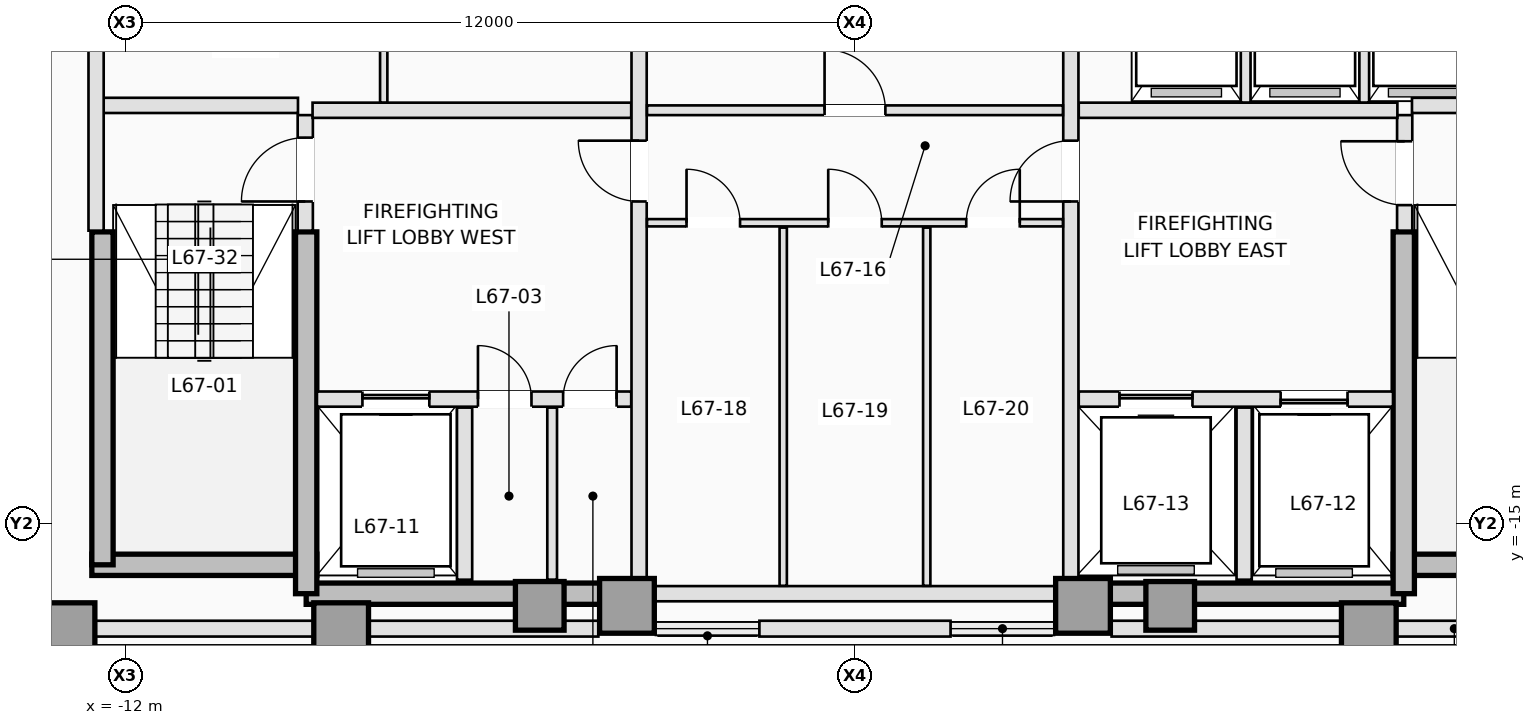
"""IFC4 building model, lengths in metres.
Left out: names, types, materials, properties, quantities, classifications, styles, units other than length and angle.
Written with IfcOpenShell. Run it as: python <this file> out.ifc"""

import sys

from ifc_helpers import new_model, si_unit, direction, frame, frame_2d, origin, origin_2d, place, context, subcontext, project, spatial, rectangle, extrude, element, fill, save


model = new_model("IFC4")
c1 = context("Model", 3, precision=1e-05, world=origin(), true_north=direction((0.0, 1.0)))
c2 = subcontext(c1, "Body", "Model", "MODEL_VIEW")
j1 = project(units=[si_unit("LENGTHUNIT", "METRE"), si_unit("PLANEANGLEUNIT", "RADIAN")], contexts=[c1])
p1 = place(None, origin())
s1 = spatial("IfcSite", under=j1, at=p1, CompositionType="ELEMENT")
p2 = place(p1, origin())
s2 = spatial("IfcBuilding", under=s1, at=p2, CompositionType="ELEMENT")
p3 = place(p2, frame((0.0, 0.0, 242.9)))
s3 = spatial("IfcBuildingStorey", under=s2, at=p3, CompositionType="ELEMENT", Elevation=242.9)
p4 = place(p3, frame((-12.55, -15.675, 0.0), z_axis=(0.0, 0.0, 1.0), x_axis=(1.0, 0.0, 0.0)))
e1 = element("IfcWall", 1, at=p4, inside=s3, PredefinedType="SHEAR", context=c2, shape_type="SweptSolid", body=[
    extrude(rectangle(XDim=3.7, YDim=0.35, at=frame_2d((1.85, 0.0))), origin(), (0.0, 0.0, 1.0), 3.5),
])
for number, where, z_axis, x_axis in (
    (2, (-9.025, -16.15, 0.0), (0.0, 0.0, 1.0), (1.0, 0.0, 0.0)),
    (3, (3.75, -16.15, 0.0), (0.0, 0.0, 1.0), (1.0, 0.0, 0.0)),
):
    element("IfcWall", number, at=place(p3, frame(where, z_axis=z_axis, x_axis=x_axis)), inside=s3, PredefinedType="SHEAR", context=c2, shape_type="SweptSolid", body=[
        extrude(rectangle(XDim=5.275, YDim=0.35, at=frame_2d((2.637, 0.0))), origin(), (0.0, 0.0, 1.0), 3.5),
    ])
p5 = place(p3, frame((8.85, -15.675, 0.0), z_axis=(0.0, 0.0, 1.0), x_axis=(1.0, 0.0, 0.0)))
e4 = element("IfcWall", 4, at=p5, inside=s3, PredefinedType="SHEAR", context=c2, shape_type="SweptSolid", body=[
    extrude(rectangle(XDim=3.7, YDim=0.35, at=frame_2d((1.85, 0.0))), origin(), (0.0, 0.0, 1.0), 3.5),
])
p6 = place(p3, frame((-12.375, -15.675, 0.0), z_axis=(0.0, 0.0, 1.0), x_axis=(0.0, 1.0, 0.0)))
e5 = element("IfcWall", 5, at=p6, inside=s3, PredefinedType="SHEAR", context=c2, shape_type="SweptSolid", body=[
    extrude(rectangle(XDim=5.475, YDim=0.35, at=frame_2d((2.738, 0.0))), origin(), (0.0, 0.0, 1.0), 3.5),
])
for number, where, z_axis, x_axis in (
    (6, (-9.025, -16.15, 0.0), (0.0, 0.0, 1.0), (0.0, 1.0, 0.0)),
    (7, (9.025, -16.15, 0.0), (0.0, 0.0, 1.0), (0.0, 1.0, 0.0)),
):
    element("IfcWall", number, at=place(p3, frame(where, z_axis=z_axis, x_axis=x_axis)), inside=s3, PredefinedType="SHEAR", context=c2, shape_type="SweptSolid", body=[
        extrude(rectangle(XDim=5.95, YDim=0.35, at=frame_2d((2.975, 0.0))), origin(), (0.0, 0.0, 1.0), 3.5),
    ])
for number, where, z_axis, x_axis in (
    (8, (-12.95, -16.75, 0.0), (0.0, 0.0, 1.0), (1.0, 0.0, 0.0)),
    (9, (-8.45, -16.75, 0.0), (0.0, 0.0, 1.0), (1.0, 0.0, 0.0)),
    (10, (-3.75, -16.35, 0.0), (0.0, 0.0, 1.0), (1.0, 0.0, 0.0)),
    (11, (3.75, -16.35, 0.0), (0.0, 0.0, 1.0), (1.0, 0.0, 0.0)),
    (12, (8.45, -16.75, 0.0), (0.0, 0.0, 1.0), (1.0, 0.0, 0.0)),
):
    element("IfcColumn", number, at=place(p3, frame(where, z_axis=z_axis, x_axis=x_axis)), inside=s3, PredefinedType="COLUMN", context=c2, shape_type="SweptSolid", body=[
        extrude(rectangle(XDim=0.9, YDim=0.9, at=origin_2d()), origin(), (0.0, 0.0, 1.0), 3.5),
    ])
for number, where, z_axis, x_axis in (
    (13, (-5.184, -16.35, 0.0), (0.0, 0.0, 1.0), (0.0, 1.0, 0.0)),
    (14, (5.184, -16.35, 0.0), (0.0, 0.0, 1.0), (0.0, 1.0, 0.0)),
):
    element("IfcColumn", number, at=place(p3, frame(where, z_axis=z_axis, x_axis=x_axis)), inside=s3, PredefinedType="COLUMN", context=c2, shape_type="SweptSolid", body=[
        extrude(rectangle(XDim=0.8, YDim=0.8, at=origin_2d()), origin(), (0.0, 0.0, 1.0), 3.5),
    ])
for number, where, z_axis, x_axis in (
    (15, (15.493, -16.725, 0.0), (0.0, 0.0, 1.0), (-1.0, 0.0, 0.0)),
    (16, (-4.22, -16.725, 0.0), (0.0, 0.0, 1.0), (-1.0, 0.0, 0.0)),
):
    element("IfcWall", number, at=place(p3, frame(where, z_axis=z_axis, x_axis=x_axis)), inside=s3, PredefinedType="STANDARD", context=c2, shape_type="SweptSolid", body=[
        extrude(rectangle(XDim=11.273, YDim=0.26, at=frame_2d((5.636, 0.0))), origin(), (0.0, 0.0, 1.0), 2.79),
    ])
p7 = place(p3, frame((1.572, -16.725, 0.0), z_axis=(0.0, 0.0, 1.0), x_axis=(-1.0, 0.0, 0.0)))
e17 = element("IfcWall", 17, at=p7, inside=s3, PredefinedType="STANDARD", context=c2, shape_type="SweptSolid", body=[
    extrude(rectangle(XDim=3.143, YDim=0.26, at=frame_2d((1.572, 0.0))), origin(), (0.0, 0.0, 1.0), 3.25),
])
p8 = place(p3, frame((-9.04, -10.18, 0.0), z_axis=(0.0, 0.0, 1.0), x_axis=(0.0, 1.0, 0.0)))
e18 = element("IfcWall", 18, at=p8, inside=s3, PredefinedType="PARTITIONING", context=c2, shape_type="SweptSolid", body=[
    extrude(rectangle(XDim=1.9, YDim=0.25, at=frame_2d((0.95, 0.0))), origin(), (0.0, 0.0, 1.0), 3.25),
])
p9 = place(p8, frame((0.48, 0.0, 0.0)))
e19 = element("IfcOpeningElement", 19, at=p9, cuts=e18, PredefinedType="OPENING", context=c2, shape_type="SweptSolid", body=[
    extrude(rectangle(XDim=1.05, YDim=2.15, at=frame_2d((0.525, 1.075))), frame((0.0, 0.135, 0.0), z_axis=(0.0, -1.0, 0.0), x_axis=(1.0, 0.0, 0.0)), (0.0, 0.0, 1.0), 0.27),
])
p10 = place(p3, frame((9.04, -10.18, 0.0), z_axis=(0.0, 0.0, 1.0), x_axis=(0.0, 1.0, 0.0)))
e20 = element("IfcWall", 20, at=p10, inside=s3, PredefinedType="PARTITIONING", context=c2, shape_type="SweptSolid", body=[
    extrude(rectangle(XDim=1.9, YDim=0.25, at=frame_2d((0.95, 0.0))), origin(), (0.0, 0.0, 1.0), 3.25),
])
p11 = place(p10, frame((0.42, 0.0, 0.0)))
e21 = element("IfcOpeningElement", 21, at=p11, cuts=e20, PredefinedType="OPENING", context=c2, shape_type="SweptSolid", body=[
    extrude(rectangle(XDim=1.05, YDim=2.15, at=frame_2d((0.525, 1.075))), frame((0.0, 0.135, 0.0), z_axis=(0.0, -1.0, 0.0), x_axis=(1.0, 0.0, 0.0)), (0.0, 0.0, 1.0), 0.27),
])
for number, where, z_axis, x_axis in (
    (22, (-12.38, -8.12, 0.0), (0.0, 0.0, 1.0), (1.0, 0.0, 0.0)),
    (23, (9.16, -8.12, 0.0), (0.0, 0.0, 1.0), (1.0, 0.0, 0.0)),
):
    element("IfcWall", number, at=place(p3, frame(where, z_axis=z_axis, x_axis=x_axis)), inside=s3, PredefinedType="PARTITIONING", context=c2, shape_type="SweptSolid", body=[
        extrude(rectangle(XDim=3.22, YDim=0.25, at=frame_2d((1.61, 0.0))), origin(), (0.0, 0.0, 1.0), 3.25),
    ])
p12 = place(p3, frame((-12.48, -10.18, 0.0), z_axis=(0.0, 0.0, 1.0), x_axis=(0.0, 1.0, 0.0)))
e24 = element("IfcWall", 24, at=p12, inside=s3, PredefinedType="PARTITIONING", context=c2, shape_type="SweptSolid", body=[
    extrude(rectangle(XDim=4.84, YDim=0.25, at=frame_2d((2.42, 0.0))), origin(), (0.0, 0.0, 1.0), 3.25),
])
p13 = place(p3, frame((-8.848, -12.95, 0.0), z_axis=(0.0, 0.0, 1.0), x_axis=(1.0, 0.0, 0.0)))
e25 = element("IfcWall", 25, at=p13, inside=s3, PredefinedType="PARTITIONING", context=c2, shape_type="SweptSolid", body=[
    extrude(rectangle(XDim=5.168, YDim=0.25, at=frame_2d((2.584, 0.0))), origin(), (0.0, 0.0, 1.0), 3.25),
])
p14 = place(p13, frame((0.748, 0.0, 0.0)))
e26 = element("IfcOpeningElement", 26, at=p14, cuts=e25, PredefinedType="OPENING", context=c2, shape_type="SweptSolid", body=[
    extrude(rectangle(XDim=1.1, YDim=2.15, at=frame_2d((0.55, 1.075))), frame((0.0, 0.135, 0.0), z_axis=(0.0, -1.0, 0.0), x_axis=(1.0, 0.0, 0.0)), (0.0, 0.0, 1.0), 0.27),
])
p15 = place(p13, frame((2.648, 0.0, 0.0)))
e27 = element("IfcOpeningElement", 27, at=p15, cuts=e25, PredefinedType="OPENING", context=c2, shape_type="SweptSolid", body=[
    extrude(rectangle(XDim=0.88, YDim=2.1, at=frame_2d((0.44, 1.05))), frame((0.0, 0.135, 0.0), z_axis=(0.0, -1.0, 0.0), x_axis=(1.0, 0.0, 0.0)), (0.0, 0.0, 1.0), 0.27),
])
p16 = place(p13, frame((4.048, 0.0, 0.0)))
e28 = element("IfcOpeningElement", 28, at=p16, cuts=e25, PredefinedType="OPENING", context=c2, shape_type="SweptSolid", body=[
    extrude(rectangle(XDim=0.88, YDim=2.1, at=frame_2d((0.44, 1.05))), frame((0.0, 0.135, 0.0), z_axis=(0.0, -1.0, 0.0), x_axis=(1.0, 0.0, 0.0)), (0.0, 0.0, 1.0), 0.27),
])
p17 = place(p3, frame((3.68, -12.95, 0.0), z_axis=(0.0, 0.0, 1.0), x_axis=(1.0, 0.0, 0.0)))
e29 = element("IfcWall", 29, at=p17, inside=s3, PredefinedType="PARTITIONING", context=c2, shape_type="SweptSolid", body=[
    extrude(rectangle(XDim=5.168, YDim=0.25, at=frame_2d((2.584, 0.0))), origin(), (0.0, 0.0, 1.0), 3.25),
])
p18 = place(p17, frame((3.32, 0.0, 0.0)))
e30 = element("IfcOpeningElement", 30, at=p18, cuts=e29, PredefinedType="OPENING", context=c2, shape_type="SweptSolid", body=[
    extrude(rectangle(XDim=1.1, YDim=2.15, at=frame_2d((0.55, 1.075))), frame((0.0, 0.135, 0.0), z_axis=(0.0, -1.0, 0.0), x_axis=(1.0, 0.0, 0.0)), (0.0, 0.0, 1.0), 0.27),
])
p19 = place(p17, frame((0.67, 0.0, 0.0)))
e31 = element("IfcOpeningElement", 31, at=p19, cuts=e29, PredefinedType="OPENING", context=c2, shape_type="SweptSolid", body=[
    extrude(rectangle(XDim=1.2, YDim=2.15, at=frame_2d((0.6, 1.075))), frame((0.0, 0.135, 0.0), z_axis=(0.0, -1.0, 0.0), x_axis=(1.0, 0.0, 0.0)), (0.0, 0.0, 1.0), 0.27),
])
p20 = place(p3, frame((-6.42, -15.92, 0.0), z_axis=(0.0, 0.0, 1.0), x_axis=(0.0, 1.0, 0.0)))
e32 = element("IfcWall", 32, at=p20, inside=s3, PredefinedType="PARTITIONING", context=c2, shape_type="SweptSolid", body=[
    extrude(rectangle(XDim=2.83, YDim=0.25, at=frame_2d((1.415, 0.0))), origin(), (0.0, 0.0, 1.0), 3.25),
])
p21 = place(p3, frame((-4.98, -15.92, 0.0), z_axis=(0.0, 0.0, 1.0), x_axis=(0.0, 1.0, 0.0)))
e33 = element("IfcWall", 33, at=p21, inside=s3, PredefinedType="PARTITIONING", context=c2, shape_type="SweptSolid", body=[
    extrude(rectangle(XDim=2.83, YDim=0.16, at=frame_2d((1.415, 0.0))), origin(), (0.0, 0.0, 1.0), 3.25),
])
p22 = place(p3, frame((6.4, -15.92, 0.0), z_axis=(0.0, 0.0, 1.0), x_axis=(0.0, 1.0, 0.0)))
e34 = element("IfcWall", 34, at=p22, inside=s3, PredefinedType="PARTITIONING", context=c2, shape_type="SweptSolid", body=[
    extrude(rectangle(XDim=2.83, YDim=0.25, at=frame_2d((1.415, 0.0))), origin(), (0.0, 0.0, 1.0), 3.25),
])
for number, where, z_axis, x_axis in (
    (35, (-8.92, -8.2, 0.0), (0.0, 0.0, 1.0), (1.0, 0.0, 0.0)),
    (36, (3.68, -8.2, 0.0), (0.0, 0.0, 1.0), (1.0, 0.0, 0.0)),
):
    element("IfcWall", number, at=place(p3, frame(where, z_axis=z_axis, x_axis=x_axis)), inside=s3, PredefinedType="PARTITIONING", context=c2, shape_type="SweptSolid", body=[
        extrude(rectangle(XDim=5.24, YDim=0.25, at=frame_2d((2.62, 0.0))), origin(), (0.0, 0.0, 1.0), 3.25),
    ])
p23 = place(p3, frame((-3.55, -15.898, 0.0), z_axis=(0.0, 0.0, 1.0), x_axis=(0.0, 1.0, 0.0)))
e37 = element("IfcWall", 37, at=p23, inside=s3, PredefinedType="PARTITIONING", context=c2, shape_type="SweptSolid", body=[
    extrude(rectangle(XDim=10.558, YDim=0.25, at=frame_2d((5.279, 0.0))), origin(), (0.0, 0.0, 1.0), 3.25),
])
p24 = place(p23, frame((6.198, 0.0, 0.0)))
e38 = element("IfcOpeningElement", 38, at=p24, cuts=e37, PredefinedType="OPENING", context=c2, shape_type="SweptSolid", body=[
    extrude(rectangle(XDim=1.0, YDim=2.15, at=frame_2d((0.5, 1.075))), frame((0.0, 0.135, 0.0), z_axis=(0.0, -1.0, 0.0), x_axis=(1.0, 0.0, 0.0)), (0.0, 0.0, 1.0), 0.27),
])
p25 = place(p3, frame((3.55, -15.898, 0.0), z_axis=(0.0, 0.0, 1.0), x_axis=(0.0, 1.0, 0.0)))
e39 = element("IfcWall", 39, at=p25, inside=s3, PredefinedType="PARTITIONING", context=c2, shape_type="SweptSolid", body=[
    extrude(rectangle(XDim=10.558, YDim=0.25, at=frame_2d((5.279, 0.0))), origin(), (0.0, 0.0, 1.0), 3.25),
])
p26 = place(p25, frame((6.198, 0.0, 0.0)))
e40 = element("IfcOpeningElement", 40, at=p26, cuts=e39, PredefinedType="OPENING", context=c2, shape_type="SweptSolid", body=[
    extrude(rectangle(XDim=1.0, YDim=2.15, at=frame_2d((0.5, 1.075))), frame((0.0, 0.135, 0.0), z_axis=(0.0, -1.0, 0.0), x_axis=(1.0, 0.0, 0.0)), (0.0, 0.0, 1.0), 0.27),
])
p27 = place(p3, frame((-7.75, -8.073, 0.0), z_axis=(0.0, 0.0, 1.0), x_axis=(0.0, 1.0, 0.0)))
e41 = element("IfcWall", 41, at=p27, inside=s3, PredefinedType="PARTITIONING", context=c2, shape_type="SweptSolid", body=[
    extrude(rectangle(XDim=2.733, YDim=0.12, at=frame_2d((1.366, 0.0))), origin(), (0.0, 0.0, 1.0), 3.25),
])
for number, where, z_axis, x_axis in (
    (42, (6.425, -8.073, 0.0), (0.0, 0.0, 1.0), (0.0, 1.0, 0.0)),
    (43, (8.375, -8.073, 0.0), (0.0, 0.0, 1.0), (0.0, 1.0, 0.0)),
):
    element("IfcWall", number, at=place(p3, frame(where, z_axis=z_axis, x_axis=x_axis)), inside=s3, PredefinedType="PARTITIONING", context=c2, shape_type="SweptSolid", body=[
        extrude(rectangle(XDim=2.733, YDim=0.16, at=frame_2d((1.366, 0.0))), origin(), (0.0, 0.0, 1.0), 3.25),
    ])
p28 = place(p3, frame((-3.298, -16.15, 0.0), z_axis=(0.0, 0.0, 1.0), x_axis=(1.0, 0.0, 0.0)))
e44 = element("IfcWall", 44, at=p28, inside=s3, PredefinedType="PARTITIONING", context=c2, shape_type="SweptSolid", body=[
    extrude(rectangle(XDim=6.596, YDim=0.25, at=frame_2d((3.298, 0.0))), origin(), (0.0, 0.0, 1.0), 2.844),
])
p29 = place(p3, frame((-3.42, -8.2, 0.0), z_axis=(0.0, 0.0, 1.0), x_axis=(1.0, 0.0, 0.0)))
e45 = element("IfcWall", 45, at=p29, inside=s3, PredefinedType="PARTITIONING", context=c2, shape_type="SweptSolid", body=[
    extrude(rectangle(XDim=6.84, YDim=0.16, at=frame_2d((3.42, 0.0))), origin(), (0.0, 0.0, 1.0), 3.25),
])
p30 = place(p29, frame((2.92, 0.0, 0.0)))
e46 = element("IfcOpeningElement", 46, at=p30, cuts=e45, PredefinedType="OPENING", context=c2, shape_type="SweptSolid", body=[
    extrude(rectangle(XDim=1.0, YDim=2.15, at=frame_2d((0.5, 1.075))), frame((0.0, 0.09, 0.0), z_axis=(0.0, -1.0, 0.0), x_axis=(1.0, 0.0, 0.0)), (0.0, 0.0, 1.0), 0.18),
])
p31 = place(p3, frame((-3.42, -10.05, 0.0), z_axis=(0.0, 0.0, 1.0), x_axis=(1.0, 0.0, 0.0)))
e47 = element("IfcWall", 47, at=p31, inside=s3, PredefinedType="PARTITIONING", context=c2, shape_type="SweptSolid", body=[
    extrude(rectangle(XDim=6.84, YDim=0.12, at=frame_2d((3.42, 0.0))), origin(), (0.0, 0.0, 1.0), 3.25),
])
p32 = place(p31, frame((0.65, 0.0, 0.0)))
e48 = element("IfcOpeningElement", 48, at=p32, cuts=e47, PredefinedType="OPENING", context=c2, shape_type="SweptSolid", body=[
    extrude(rectangle(XDim=0.88, YDim=2.12, at=frame_2d((0.44, 1.06))), frame((0.0, 0.07, 0.0), z_axis=(0.0, -1.0, 0.0), x_axis=(1.0, 0.0, 0.0)), (0.0, 0.0, 1.0), 0.14),
])
p33 = place(p31, frame((2.98, 0.0, 0.0)))
e49 = element("IfcOpeningElement", 49, at=p33, cuts=e47, PredefinedType="OPENING", context=c2, shape_type="SweptSolid", body=[
    extrude(rectangle(XDim=0.88, YDim=2.12, at=frame_2d((0.44, 1.06))), frame((0.0, 0.07, 0.0), z_axis=(0.0, -1.0, 0.0), x_axis=(1.0, 0.0, 0.0)), (0.0, 0.0, 1.0), 0.14),
])
p34 = place(p31, frame((5.25, 0.0, 0.0)))
e50 = element("IfcOpeningElement", 50, at=p34, cuts=e47, PredefinedType="OPENING", context=c2, shape_type="SweptSolid", body=[
    extrude(rectangle(XDim=0.88, YDim=2.12, at=frame_2d((0.44, 1.06))), frame((0.0, 0.07, 0.0), z_axis=(0.0, -1.0, 0.0), x_axis=(1.0, 0.0, 0.0)), (0.0, 0.0, 1.0), 0.14),
])
for number, where, z_axis, x_axis in (
    (51, (-1.18, -16.02, 0.0), (0.0, 0.0, 1.0), (0.0, 1.0, 0.0)),
    (52, (1.18, -16.02, 0.0), (0.0, 0.0, 1.0), (0.0, 1.0, 0.0)),
):
    element("IfcWall", number, at=place(p3, frame(where, z_axis=z_axis, x_axis=x_axis)), inside=s3, PredefinedType="PARTITIONING", context=c2, shape_type="SweptSolid", body=[
        extrude(rectangle(XDim=5.89, YDim=0.12, at=frame_2d((2.945, 0.0))), origin(), (0.0, 0.0, 1.0), 3.25),
    ])
p35 = place(p14, origin())
e53 = element("IfcDoor", 53, at=p35, inside=s3, OperationType="SLIDING_TO_LEFT", PredefinedType="DOOR", context=c2, shape_type="SweptSolid", body=[
    extrude(rectangle(XDim=1.1, YDim=2.15, at=frame_2d((0.55, 1.075))), frame((0.0, 0.025, 0.0), z_axis=(0.0, -1.0, 0.0), x_axis=(1.0, 0.0, 0.0)), (0.0, 0.0, 1.0), 0.05),
])
fill(e26, e53)
p36 = place(p18, origin())
e54 = element("IfcDoor", 54, at=p36, inside=s3, OperationType="SLIDING_TO_RIGHT", PredefinedType="DOOR", context=c2, shape_type="SweptSolid", body=[
    extrude(rectangle(XDim=1.1, YDim=2.15, at=frame_2d((0.55, 1.075))), frame((0.0, 0.025, 0.0), z_axis=(0.0, -1.0, 0.0), x_axis=(1.0, 0.0, 0.0)), (0.0, 0.0, 1.0), 0.05),
])
fill(e30, e54)
p37 = place(p19, origin())
e55 = element("IfcDoor", 55, at=p37, inside=s3, OperationType="SLIDING_TO_LEFT", PredefinedType="DOOR", context=c2, shape_type="SweptSolid", body=[
    extrude(rectangle(XDim=1.2, YDim=2.15, at=frame_2d((0.6, 1.075))), frame((0.0, 0.025, 0.0), z_axis=(0.0, -1.0, 0.0), x_axis=(1.0, 0.0, 0.0)), (0.0, 0.0, 1.0), 0.05),
])
fill(e31, e55)
p38 = place(p9, origin())
e56 = element("IfcDoor", 56, at=p38, inside=s3, OperationType="SINGLE_SWING_LEFT", PredefinedType="DOOR", context=c2, shape_type="SweptSolid", body=[
    extrude(rectangle(XDim=1.05, YDim=2.15, at=frame_2d((0.525, 1.075))), frame((0.0, 0.025, 0.0), z_axis=(0.0, -1.0, 0.0), x_axis=(1.0, 0.0, 0.0)), (0.0, 0.0, 1.0), 0.05),
])
fill(e19, e56)
p39 = place(p11, origin())
e57 = element("IfcDoor", 57, at=p39, inside=s3, OperationType="SINGLE_SWING_RIGHT", PredefinedType="DOOR", context=c2, shape_type="SweptSolid", body=[
    extrude(rectangle(XDim=1.05, YDim=2.15, at=frame_2d((0.525, 1.075))), frame((0.0, 0.025, 0.0), z_axis=(0.0, -1.0, 0.0), x_axis=(1.0, 0.0, 0.0)), (0.0, 0.0, 1.0), 0.05),
])
fill(e21, e57)
p40 = place(p15, origin())
e58 = element("IfcDoor", 58, at=p40, inside=s3, OperationType="SINGLE_SWING_LEFT", PredefinedType="TRAPDOOR", context=c2, shape_type="SweptSolid", body=[
    extrude(rectangle(XDim=0.88, YDim=2.1, at=frame_2d((0.44, 1.05))), frame((0.0, 0.025, 0.0), z_axis=(0.0, -1.0, 0.0), x_axis=(1.0, 0.0, 0.0)), (0.0, 0.0, 1.0), 0.05),
])
fill(e27, e58)
p41 = place(p16, origin())
e59 = element("IfcDoor", 59, at=p41, inside=s3, OperationType="SINGLE_SWING_RIGHT", PredefinedType="TRAPDOOR", context=c2, shape_type="SweptSolid", body=[
    extrude(rectangle(XDim=0.88, YDim=2.1, at=frame_2d((0.44, 1.05))), frame((0.0, 0.025, 0.0), z_axis=(0.0, -1.0, 0.0), x_axis=(1.0, 0.0, 0.0)), (0.0, 0.0, 1.0), 0.05),
])
fill(e28, e59)
p42 = place(p24, origin())
e60 = element("IfcDoor", 60, at=p42, inside=s3, OperationType="SINGLE_SWING_RIGHT", PredefinedType="DOOR", context=c2, shape_type="SweptSolid", body=[
    extrude(rectangle(XDim=1.0, YDim=2.15, at=frame_2d((0.5, 1.075))), frame((0.0, 0.025, 0.0), z_axis=(0.0, -1.0, 0.0), x_axis=(1.0, 0.0, 0.0)), (0.0, 0.0, 1.0), 0.05),
])
fill(e38, e60)
p43 = place(p26, origin())
e61 = element("IfcDoor", 61, at=p43, inside=s3, OperationType="SINGLE_SWING_LEFT", PredefinedType="DOOR", context=c2, shape_type="SweptSolid", body=[
    extrude(rectangle(XDim=1.0, YDim=2.15, at=frame_2d((0.5, 1.075))), frame((0.0, 0.025, 0.0), z_axis=(0.0, -1.0, 0.0), x_axis=(1.0, 0.0, 0.0)), (0.0, 0.0, 1.0), 0.05),
])
fill(e40, e61)
p44 = place(p30, origin())
e62 = element("IfcDoor", 62, at=p44, inside=s3, OperationType="SINGLE_SWING_LEFT", PredefinedType="DOOR", context=c2, shape_type="SweptSolid", body=[
    extrude(rectangle(XDim=1.0, YDim=2.15, at=frame_2d((0.5, 1.075))), frame((0.0, 0.025, 0.0), z_axis=(0.0, -1.0, 0.0), x_axis=(1.0, 0.0, 0.0)), (0.0, 0.0, 1.0), 0.05),
])
fill(e46, e62)
p45 = place(p32, origin())
e63 = element("IfcDoor", 63, at=p45, inside=s3, OperationType="SINGLE_SWING_LEFT", PredefinedType="DOOR", context=c2, shape_type="SweptSolid", body=[
    extrude(rectangle(XDim=0.88, YDim=2.12, at=frame_2d((0.44, 1.06))), frame((0.0, 0.025, 0.0), z_axis=(0.0, -1.0, 0.0), x_axis=(1.0, 0.0, 0.0)), (0.0, 0.0, 1.0), 0.05),
])
fill(e48, e63)
p46 = place(p33, origin())
e64 = element("IfcDoor", 64, at=p46, inside=s3, OperationType="SINGLE_SWING_LEFT", PredefinedType="DOOR", context=c2, shape_type="SweptSolid", body=[
    extrude(rectangle(XDim=0.88, YDim=2.12, at=frame_2d((0.44, 1.06))), frame((0.0, 0.025, 0.0), z_axis=(0.0, -1.0, 0.0), x_axis=(1.0, 0.0, 0.0)), (0.0, 0.0, 1.0), 0.05),
])
fill(e49, e64)
p47 = place(p34, origin())
e65 = element("IfcDoor", 65, at=p47, inside=s3, OperationType="SINGLE_SWING_RIGHT", PredefinedType="DOOR", context=c2, shape_type="SweptSolid", body=[
    extrude(rectangle(XDim=0.88, YDim=2.12, at=frame_2d((0.44, 1.06))), frame((0.0, 0.025, 0.0), z_axis=(0.0, -1.0, 0.0), x_axis=(1.0, 0.0, 0.0)), (0.0, 0.0, 1.0), 0.05),
])
fill(e50, e65)
save(model, sys.argv[1])
